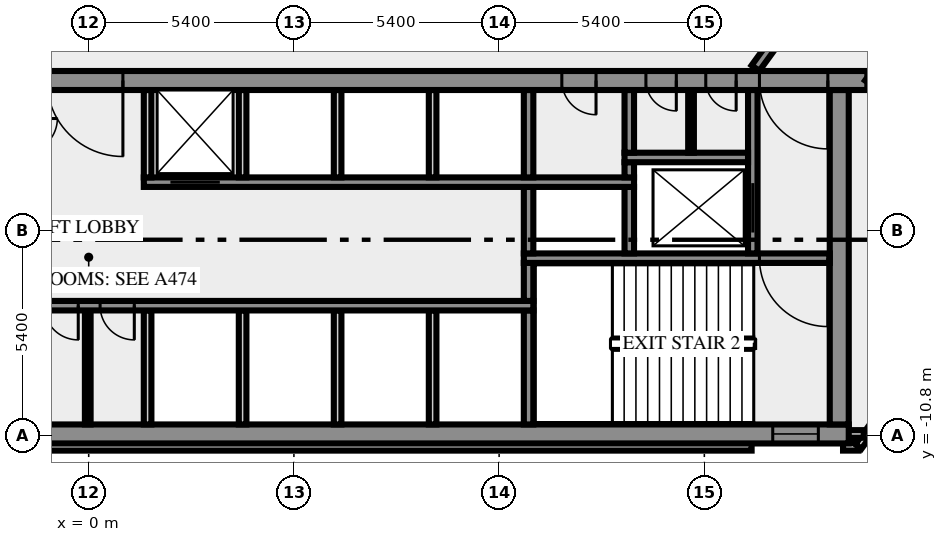
"""IFC4 building model, lengths in metres.
Left out: names, types, materials, properties, quantities, classifications, styles, units other than length and angle.
Written with IfcOpenShell. Run it as: python <this file> out.ifc"""

import sys

from ifc_helpers import new_model, si_unit, direction, frame, frame_2d, origin, place, context, subcontext, project, spatial, rectangle, extrude, element, fill, save


model = new_model("IFC4")
c1 = context("Model", 3, precision=1e-05, world=origin(), true_north=direction((0.0, 1.0)))
c2 = subcontext(c1, "Body", "Model", "MODEL_VIEW")
j1 = project(units=[si_unit("LENGTHUNIT", "METRE"), si_unit("PLANEANGLEUNIT", "RADIAN")], contexts=[c1])
p1 = place(None, origin())
s1 = spatial("IfcSite", under=j1, at=p1, CompositionType="ELEMENT")
p2 = place(p1, origin())
s2 = spatial("IfcBuilding", under=s1, at=p2, CompositionType="ELEMENT")
p3 = place(p2, frame((0.0, 0.0, 125.0)))
s3 = spatial("IfcBuildingStorey", under=s2, at=p3, CompositionType="ELEMENT", Elevation=125.0)
p4 = place(p3, frame((-17.444, -11.088, 0.0), z_axis=(0.0, 0.0, 1.0), x_axis=(1.0, 0.0, 0.0)))
e1 = element("IfcWall", 1, at=p4, inside=s3, PredefinedType="SOLIDWALL", context=c2, shape_type="SweptSolid", body=[
    extrude(rectangle(XDim=34.888, YDim=0.2, at=frame_2d((17.444, 0.0))), origin(), (0.0, 0.0, 1.0), 3.65),
])
p5 = place(p3, frame((19.85, -11.088, 0.0), z_axis=(0.0, 0.0, 1.0), x_axis=(1.0, 0.0, 0.0)))
e2 = element("IfcWall", 2, at=p5, inside=s3, PredefinedType="SOLIDWALL", context=c2, shape_type="SweptSolid", body=[
    extrude(rectangle(XDim=0.406, YDim=0.2, at=frame_2d((0.203, 0.0))), origin(), (0.0, 0.0, 1.0), 3.65),
])
p6 = place(p3, frame((20.253, -11.083, 0.0), z_axis=(0.0, 0.0, 1.0), x_axis=(0.587766567315, 0.809030569476, 0.0)))
e3 = element("IfcWall", 3, at=p6, inside=s3, PredefinedType="SOLIDWALL", context=c2, shape_type="SweptSolid", body=[
    extrude(rectangle(XDim=2.688, YDim=0.2, at=frame_2d((1.344, 0.0))), origin(), (0.0, 0.0, 1.0), 3.65),
])
p7 = place(p3, frame((19.98, -10.75, 0.0), z_axis=(0.0, 0.0, 1.0), x_axis=(1.0, 0.0, 0.0)))
e4 = element("IfcWall", 4, at=p7, inside=s3, PredefinedType="SOLIDWALL", context=c2, shape_type="SweptSolid", body=[
    extrude(rectangle(XDim=0.417, YDim=0.2, at=frame_2d((0.208, 0.0))), origin(), (0.0, 0.0, 1.0), 3.65),
])
p8 = place(p3, frame((-20.0, -10.75, 0.0), z_axis=(0.0, 0.0, 1.0), x_axis=(1.0, 0.0, 0.0)))
e5 = element("IfcWall", 5, at=p8, inside=s3, PredefinedType="SHEAR", context=c2, shape_type="SweptSolid", body=[
    extrude(rectangle(XDim=40.0, YDim=0.5, at=frame_2d((20.0, 0.0))), origin(), (0.0, 0.0, 1.0), 3.65),
])
p9 = place(p8, frame((0.8, 0.0, 1.0)))
e6 = element("IfcOpeningElement", 6, at=p9, cuts=e5, PredefinedType="OPENING", context=c2, shape_type="SweptSolid", body=[
    extrude(rectangle(XDim=1.2, YDim=1.2, at=frame_2d((0.6, 0.6))), frame((0.0, 0.26, 0.0), z_axis=(0.0, -1.0, 0.0), x_axis=(1.0, 0.0, 0.0)), (0.0, 0.0, 1.0), 0.52),
])
p10 = place(p8, frame((38.0, 0.0, 1.0)))
e7 = element("IfcOpeningElement", 7, at=p10, cuts=e5, PredefinedType="OPENING", context=c2, shape_type="SweptSolid", body=[
    extrude(rectangle(XDim=1.2, YDim=1.2, at=frame_2d((0.6, 0.6))), frame((0.0, 0.26, 0.0), z_axis=(0.0, -1.0, 0.0), x_axis=(1.0, 0.0, 0.0)), (0.0, 0.0, 1.0), 0.52),
])
p11 = place(p3, frame((-0.025, -10.5, 0.0), z_axis=(0.0, 0.0, 1.0), x_axis=(0.0, 1.0, 0.0)))
e8 = element("IfcWall", 8, at=p11, inside=s3, PredefinedType="PARTITIONING", context=c2, shape_type="SweptSolid", body=[
    extrude(rectangle(XDim=3.0, YDim=0.15, at=frame_2d((1.5, 0.0))), origin(), (0.0, 0.0, 1.0), 3.65),
])
for number, where, z_axis, x_axis in (
    (9, (1.55, -10.5, 0.0), (0.0, 0.0, 1.0), (0.0, 1.0, 0.0)),
    (10, (4.05, -10.5, 0.0), (0.0, 0.0, 1.0), (0.0, 1.0, 0.0)),
    (11, (6.55, -10.5, 0.0), (0.0, 0.0, 1.0), (0.0, 1.0, 0.0)),
    (12, (9.05, -10.5, 0.0), (0.0, 0.0, 1.0), (0.0, 1.0, 0.0)),
):
    element("IfcWall", number, at=place(p3, frame(where, z_axis=z_axis, x_axis=x_axis)), inside=s3, PredefinedType="SOLIDWALL", context=c2, shape_type="SweptSolid", body=[
        extrude(rectangle(XDim=3.0, YDim=0.2, at=frame_2d((1.5, 0.0))), origin(), (0.0, 0.0, 1.0), 3.65),
    ])
p12 = place(p3, frame((11.575, -10.5, 0.0), z_axis=(0.0, 0.0, 1.0), x_axis=(0.0, 1.0, 0.0)))
e13 = element("IfcWall", 13, at=p12, inside=s3, PredefinedType="SHEAR", context=c2, shape_type="SweptSolid", body=[
    extrude(rectangle(XDim=3.0, YDim=0.25, at=frame_2d((1.5, 0.0))), origin(), (0.0, 0.0, 1.0), 3.65),
])
p13 = place(p3, frame((19.75, -10.5, 0.0), z_axis=(0.0, 0.0, 1.0), x_axis=(0.0, 1.0, 0.0)))
e14 = element("IfcWall", 14, at=p13, inside=s3, PredefinedType="SHEAR", context=c2, shape_type="SweptSolid", body=[
    extrude(rectangle(XDim=8.8, YDim=0.5, at=frame_2d((4.4, 0.0))), origin(), (0.0, 0.0, 1.0), 3.65),
])
p14 = place(p3, frame((11.7, -7.375, 0.0), z_axis=(0.0, 0.0, 1.0), x_axis=(-1.0, 0.0, 0.0)))
e15 = element("IfcWall", 15, at=p14, inside=s3, PredefinedType="SHEAR", context=c2, shape_type="SweptSolid", body=[
    extrude(rectangle(XDim=23.4, YDim=0.25, at=frame_2d((11.7, 0.0))), origin(), (0.0, 0.0, 1.0), 3.65),
])
p15 = place(p14, frame((21.45, 0.0, 0.0)))
e16 = element("IfcOpeningElement", 16, at=p15, cuts=e15, PredefinedType="OPENING", context=c2, shape_type="SweptSolid", body=[
    extrude(rectangle(XDim=1.1, YDim=2.1, at=frame_2d((0.55, 1.05))), frame((0.0, 0.135, 0.0), z_axis=(0.0, -1.0, 0.0), x_axis=(1.0, 0.0, 0.0)), (0.0, 0.0, 1.0), 0.27),
])
p16 = place(p14, frame((18.95, 0.0, 0.0)))
e17 = element("IfcOpeningElement", 17, at=p16, cuts=e15, PredefinedType="OPENING", context=c2, shape_type="SweptSolid", body=[
    extrude(rectangle(XDim=1.1, YDim=2.1, at=frame_2d((0.55, 1.05))), frame((0.0, 0.135, 0.0), z_axis=(0.0, -1.0, 0.0), x_axis=(1.0, 0.0, 0.0)), (0.0, 0.0, 1.0), 0.27),
])
p17 = place(p14, frame((16.45, 0.0, 0.0)))
e18 = element("IfcOpeningElement", 18, at=p17, cuts=e15, PredefinedType="OPENING", context=c2, shape_type="SweptSolid", body=[
    extrude(rectangle(XDim=1.1, YDim=2.1, at=frame_2d((0.55, 1.05))), frame((0.0, 0.135, 0.0), z_axis=(0.0, -1.0, 0.0), x_axis=(1.0, 0.0, 0.0)), (0.0, 0.0, 1.0), 0.27),
])
p18 = place(p14, frame((14.75, 0.0, 0.0)))
e19 = element("IfcOpeningElement", 19, at=p18, cuts=e15, PredefinedType="OPENING", context=c2, shape_type="SweptSolid", body=[
    extrude(rectangle(XDim=0.7, YDim=2.1, at=frame_2d((0.35, 1.05))), frame((0.0, 0.135, 0.0), z_axis=(0.0, -1.0, 0.0), x_axis=(1.0, 0.0, 0.0)), (0.0, 0.0, 1.0), 0.27),
])
p19 = place(p14, frame((13.35, 0.0, 0.0)))
e20 = element("IfcOpeningElement", 20, at=p19, cuts=e15, PredefinedType="OPENING", context=c2, shape_type="SweptSolid", body=[
    extrude(rectangle(XDim=0.9, YDim=2.1, at=frame_2d((0.45, 1.05))), frame((0.0, 0.135, 0.0), z_axis=(0.0, -1.0, 0.0), x_axis=(1.0, 0.0, 0.0)), (0.0, 0.0, 1.0), 0.27),
])
p20 = place(p14, frame((11.975, 0.0, 0.0)))
e21 = element("IfcOpeningElement", 21, at=p20, cuts=e15, PredefinedType="OPENING", context=c2, shape_type="SweptSolid", body=[
    extrude(rectangle(XDim=0.9, YDim=2.1, at=frame_2d((0.45, 1.05))), frame((0.0, 0.135, 0.0), z_axis=(0.0, -1.0, 0.0), x_axis=(1.0, 0.0, 0.0)), (0.0, 0.0, 1.0), 0.27),
])
p21 = place(p14, frame((10.5, 0.0, 0.0)))
e22 = element("IfcOpeningElement", 22, at=p21, cuts=e15, PredefinedType="OPENING", context=c2, shape_type="SweptSolid", body=[
    extrude(rectangle(XDim=0.9, YDim=2.1, at=frame_2d((0.45, 1.05))), frame((0.0, 0.135, 0.0), z_axis=(0.0, -1.0, 0.0), x_axis=(1.0, 0.0, 0.0)), (0.0, 0.0, 1.0), 0.27),
])
p22 = place(p3, frame((11.575, -7.25, 0.0), z_axis=(0.0, 0.0, 1.0), x_axis=(0.0, 1.0, 0.0)))
e23 = element("IfcWall", 23, at=p22, inside=s3, PredefinedType="SHEAR", context=c2, shape_type="SweptSolid", body=[
    extrude(rectangle(XDim=1.0, YDim=0.25, at=frame_2d((0.5, 0.0))), origin(), (0.0, 0.0, 1.0), 3.65),
])
p23 = place(p3, frame((19.5, -6.125, 0.0), z_axis=(0.0, 0.0, 1.0), x_axis=(-1.0, 0.0, 0.0)))
e24 = element("IfcWall", 24, at=p23, inside=s3, PredefinedType="SHEAR", context=c2, shape_type="SweptSolid", body=[
    extrude(rectangle(XDim=8.05, YDim=0.25, at=frame_2d((4.025, 0.0))), origin(), (0.0, 0.0, 1.0), 3.65),
])
p24 = place(p23, frame((0.05, 0.0, 0.0)))
e25 = element("IfcOpeningElement", 25, at=p24, cuts=e24, PredefinedType="OPENING", context=c2, shape_type="SweptSolid", body=[
    extrude(rectangle(XDim=1.8, YDim=2.1, at=frame_2d((0.9, 1.05))), frame((0.0, 0.135, 0.0), z_axis=(0.0, -1.0, 0.0), x_axis=(1.0, 0.0, 0.0)), (0.0, 0.0, 1.0), 0.27),
])
for number, where, z_axis, x_axis in (
    (26, (11.575, -6.0, 0.0), (0.0, 0.0, 1.0), (0.0, 1.0, 0.0)),
    (27, (14.225, -6.0, 0.0), (0.0, 0.0, 1.0), (0.0, 1.0, 0.0)),
):
    element("IfcWall", number, at=place(p3, frame(where, z_axis=z_axis, x_axis=x_axis)), inside=s3, PredefinedType="SHEAR", context=c2, shape_type="SweptSolid", body=[
        extrude(rectangle(XDim=1.75, YDim=0.25, at=frame_2d((0.875, 0.0))), origin(), (0.0, 0.0, 1.0), 3.65),
    ])
p25 = place(p3, frame((17.475, -6.0, 0.0), z_axis=(0.0, 0.0, 1.0), x_axis=(0.0, 1.0, 0.0)))
e28 = element("IfcWall", 28, at=p25, inside=s3, PredefinedType="SHEAR", context=c2, shape_type="SweptSolid", body=[
    extrude(rectangle(XDim=4.3, YDim=0.25, at=frame_2d((2.15, 0.0))), origin(), (0.0, 0.0, 1.0), 3.65),
])
p26 = place(p25, frame((0.55, 0.0, 0.0)))
e29 = element("IfcOpeningElement", 29, at=p26, cuts=e28, PredefinedType="OPENING", context=c2, shape_type="SweptSolid", body=[
    extrude(rectangle(XDim=1.3, YDim=2.1, at=frame_2d((0.65, 1.05))), frame((0.0, 0.135, 0.0), z_axis=(0.0, -1.0, 0.0), x_axis=(1.0, 0.0, 0.0)), (0.0, 0.0, 1.0), 0.27),
])
p27 = place(p3, frame((1.45, -4.125, 0.0), z_axis=(0.0, 0.0, 1.0), x_axis=(1.0, 0.0, 0.0)))
e30 = element("IfcWall", 30, at=p27, inside=s3, PredefinedType="SHEAR", context=c2, shape_type="SweptSolid", body=[
    extrude(rectangle(XDim=12.9, YDim=0.25, at=frame_2d((6.45, 0.0))), origin(), (0.0, 0.0, 1.0), 3.65),
])
p28 = place(p27, frame((0.7, 0.0, 0.0)))
e31 = element("IfcOpeningElement", 31, at=p28, cuts=e30, PredefinedType="OPENING", context=c2, shape_type="SweptSolid", body=[
    extrude(rectangle(XDim=1.3, YDim=2.1, at=frame_2d((0.65, 1.05))), frame((0.0, 0.135, 0.0), z_axis=(0.0, -1.0, 0.0), x_axis=(1.0, 0.0, 0.0)), (0.0, 0.0, 1.0), 0.27),
])
for number, where, z_axis, x_axis in (
    (32, (1.55, -4.0, 0.0), (0.0, 0.0, 1.0), (0.0, 1.0, 0.0)),
    (33, (4.05, -4.0, 0.0), (0.0, 0.0, 1.0), (0.0, 1.0, 0.0)),
    (34, (6.55, -4.0, 0.0), (0.0, 0.0, 1.0), (0.0, 1.0, 0.0)),
    (35, (9.05, -4.0, 0.0), (0.0, 0.0, 1.0), (0.0, 1.0, 0.0)),
):
    element("IfcWall", number, at=place(p3, frame(where, z_axis=z_axis, x_axis=x_axis)), inside=s3, PredefinedType="SOLIDWALL", context=c2, shape_type="SweptSolid", body=[
        extrude(rectangle(XDim=2.3, YDim=0.2, at=frame_2d((1.15, 0.0))), origin(), (0.0, 0.0, 1.0), 3.65),
    ])
p29 = place(p3, frame((11.575, -4.0, 0.0), z_axis=(0.0, 0.0, 1.0), x_axis=(0.0, 1.0, 0.0)))
e36 = element("IfcWall", 36, at=p29, inside=s3, PredefinedType="SHEAR", context=c2, shape_type="SweptSolid", body=[
    extrude(rectangle(XDim=2.3, YDim=0.25, at=frame_2d((1.15, 0.0))), origin(), (0.0, 0.0, 1.0), 3.65),
])
p30 = place(p3, frame((14.225, -4.0, 0.0), z_axis=(0.0, 0.0, 1.0), x_axis=(0.0, 1.0, 0.0)))
e37 = element("IfcWall", 37, at=p30, inside=s3, PredefinedType="SHEAR", context=c2, shape_type="SweptSolid", body=[
    extrude(rectangle(XDim=0.4, YDim=0.25, at=frame_2d((0.2, 0.0))), origin(), (0.0, 0.0, 1.0), 3.65),
])
p31 = place(p3, frame((14.1, -3.475, 0.0), z_axis=(0.0, 0.0, 1.0), x_axis=(1.0, 0.0, 0.0)))
e38 = element("IfcWall", 38, at=p31, inside=s3, PredefinedType="SHEAR", context=c2, shape_type="SweptSolid", body=[
    extrude(rectangle(XDim=3.25, YDim=0.25, at=frame_2d((1.625, 0.0))), origin(), (0.0, 0.0, 1.0), 3.65),
])
p32 = place(p3, frame((14.225, -3.35, 0.0), z_axis=(0.0, 0.0, 1.0), x_axis=(0.0, 1.0, 0.0)))
e39 = element("IfcWall", 39, at=p32, inside=s3, PredefinedType="SHEAR", context=c2, shape_type="SweptSolid", body=[
    extrude(rectangle(XDim=1.65, YDim=0.25, at=frame_2d((0.825, 0.0))), origin(), (0.0, 0.0, 1.0), 3.65),
])
p33 = place(p3, frame((15.85, -3.35, 0.0), z_axis=(0.0, 0.0, 1.0), x_axis=(0.0, 1.0, 0.0)))
e40 = element("IfcWall", 40, at=p33, inside=s3, PredefinedType="PARTITIONING", context=c2, shape_type="SweptSolid", body=[
    extrude(rectangle(XDim=1.65, YDim=0.15, at=frame_2d((0.825, 0.0))), origin(), (0.0, 0.0, 1.0), 3.65),
])
p34 = place(p3, frame((20.49, -1.45, 0.0), z_axis=(0.0, 0.0, 1.0), x_axis=(-1.0, 0.0, 0.0)))
e41 = element("IfcWall", 41, at=p34, inside=s3, PredefinedType="SHEAR", context=c2, shape_type="SweptSolid", body=[
    extrude(rectangle(XDim=40.98, YDim=0.5, at=frame_2d((20.49, 0.0))), origin(), (0.0, 0.0, 1.0), 3.65),
])
p35 = place(p34, frame((38.14, 0.0, 0.0)))
e42 = element("IfcOpeningElement", 42, at=p35, cuts=e41, PredefinedType="OPENING", context=c2, shape_type="SweptSolid", body=[
    extrude(rectangle(XDim=1.8, YDim=2.1, at=frame_2d((0.9, 1.05))), frame((0.0, 0.26, 0.0), z_axis=(0.0, -1.0, 0.0), x_axis=(1.0, 0.0, 0.0)), (0.0, 0.0, 1.0), 0.52),
])
p36 = place(p34, frame((35.89, 0.0, 0.0)))
e43 = element("IfcOpeningElement", 43, at=p36, cuts=e41, PredefinedType="OPENING", context=c2, shape_type="SweptSolid", body=[
    extrude(rectangle(XDim=0.9, YDim=2.1, at=frame_2d((0.45, 1.05))), frame((0.0, 0.26, 0.0), z_axis=(0.0, -1.0, 0.0), x_axis=(1.0, 0.0, 0.0)), (0.0, 0.0, 1.0), 0.52),
])
p37 = place(p34, frame((32.94, 0.0, 0.0)))
e44 = element("IfcOpeningElement", 44, at=p37, cuts=e41, PredefinedType="OPENING", context=c2, shape_type="SweptSolid", body=[
    extrude(rectangle(XDim=0.9, YDim=2.1, at=frame_2d((0.45, 1.05))), frame((0.0, 0.26, 0.0), z_axis=(0.0, -1.0, 0.0), x_axis=(1.0, 0.0, 0.0)), (0.0, 0.0, 1.0), 0.52),
])
p38 = place(p34, frame((19.59, 0.0, 0.0)))
e45 = element("IfcOpeningElement", 45, at=p38, cuts=e41, PredefinedType="OPENING", context=c2, shape_type="SweptSolid", body=[
    extrude(rectangle(XDim=2.0, YDim=2.1, at=frame_2d((1.0, 1.05))), frame((0.0, 0.26, 0.0), z_axis=(0.0, -1.0, 0.0), x_axis=(1.0, 0.0, 0.0)), (0.0, 0.0, 1.0), 0.52),
])
p39 = place(p34, frame((7.14, 0.0, 0.0)))
e46 = element("IfcOpeningElement", 46, at=p39, cuts=e41, PredefinedType="OPENING", context=c2, shape_type="SweptSolid", body=[
    extrude(rectangle(XDim=0.9, YDim=2.1, at=frame_2d((0.45, 1.05))), frame((0.0, 0.26, 0.0), z_axis=(0.0, -1.0, 0.0), x_axis=(1.0, 0.0, 0.0)), (0.0, 0.0, 1.0), 0.52),
])
p40 = place(p34, frame((5.028, 0.0, 0.0)))
e47 = element("IfcOpeningElement", 47, at=p40, cuts=e41, PredefinedType="OPENING", context=c2, shape_type="SweptSolid", body=[
    extrude(rectangle(XDim=0.8, YDim=2.1, at=frame_2d((0.4, 1.05))), frame((0.0, 0.26, 0.0), z_axis=(0.0, -1.0, 0.0), x_axis=(1.0, 0.0, 0.0)), (0.0, 0.0, 1.0), 0.52),
])
p41 = place(p34, frame((3.452, 0.0, 0.0)))
e48 = element("IfcOpeningElement", 48, at=p41, cuts=e41, PredefinedType="OPENING", context=c2, shape_type="SweptSolid", body=[
    extrude(rectangle(XDim=0.8, YDim=2.1, at=frame_2d((0.4, 1.05))), frame((0.0, 0.26, 0.0), z_axis=(0.0, -1.0, 0.0), x_axis=(1.0, 0.0, 0.0)), (0.0, 0.0, 1.0), 0.52),
])
p42 = place(p34, frame((1.04, 0.0, 0.0)))
e49 = element("IfcOpeningElement", 49, at=p42, cuts=e41, PredefinedType="OPENING", context=c2, shape_type="SweptSolid", body=[
    extrude(rectangle(XDim=1.8, YDim=2.1, at=frame_2d((0.9, 1.05))), frame((0.0, 0.26, 0.0), z_axis=(0.0, -1.0, 0.0), x_axis=(1.0, 0.0, 0.0)), (0.0, 0.0, 1.0), 0.52),
])
p43 = place(p3, frame((17.545, -1.125, 0.0), z_axis=(0.0, 0.0, 1.0), x_axis=(0.587786330937, 0.809016210693, 0.0)))
e50 = element("IfcWall", 50, at=p43, inside=s3, PredefinedType="SOLIDWALL", context=c2, shape_type="SweptSolid", body=[
    extrude(rectangle(XDim=30.103, YDim=0.25, at=frame_2d((15.052, 0.0))), origin(), (0.0, 0.0, 1.0), 3.65),
])
p44 = place(p43, frame((3.441, 0.0, 0.0)))
e51 = element("IfcOpeningElement", 51, at=p44, cuts=e50, PredefinedType="OPENING", context=c2, shape_type="SweptSolid", body=[
    extrude(rectangle(XDim=0.9, YDim=2.1, at=frame_2d((0.45, 1.05))), frame((0.0, 0.135, 0.0), z_axis=(0.0, -1.0, 0.0), x_axis=(1.0, 0.0, 0.0)), (0.0, 0.0, 1.0), 0.27),
])
p45 = place(p43, frame((28.729, 0.0, 0.0)))
e52 = element("IfcOpeningElement", 52, at=p45, cuts=e50, PredefinedType="OPENING", context=c2, shape_type="SweptSolid", body=[
    extrude(rectangle(XDim=0.9, YDim=2.1, at=frame_2d((0.45, 1.05))), frame((0.0, 0.135, 0.0), z_axis=(0.0, -1.0, 0.0), x_axis=(1.0, 0.0, 0.0)), (0.0, 0.0, 1.0), 0.27),
])
p46 = place(p3, frame((37.236, 21.469, 0.0), z_axis=(0.0, 0.0, 1.0), x_axis=(-0.58778344073, -0.809018310549, 0.0)))
e53 = element("IfcWall", 53, at=p46, inside=s3, PredefinedType="SOLIDWALL", context=c2, shape_type="SweptSolid", body=[
    extrude(rectangle(XDim=28.42, YDim=0.25, at=frame_2d((14.21, 0.0))), origin(), (0.0, 0.0, 1.0), 3.65),
])
p47 = place(p46, frame((13.205, 0.0, 0.0)))
e54 = element("IfcOpeningElement", 54, at=p47, cuts=e53, PredefinedType="OPENING", context=c2, shape_type="SweptSolid", body=[
    extrude(rectangle(XDim=1.0, YDim=2.1, at=frame_2d((0.5, 1.05))), frame((0.0, 0.135, 0.0), z_axis=(0.0, -1.0, 0.0), x_axis=(1.0, 0.0, 0.0)), (0.0, 0.0, 1.0), 0.27),
])
p48 = place(p46, frame((0.224, 0.0, 0.0)))
e55 = element("IfcOpeningElement", 55, at=p48, cuts=e53, PredefinedType="OPENING", context=c2, shape_type="SweptSolid", body=[
    extrude(rectangle(XDim=0.9, YDim=2.1, at=frame_2d((0.45, 1.05))), frame((0.0, 0.135, 0.0), z_axis=(0.0, -1.0, 0.0), x_axis=(1.0, 0.0, 0.0)), (0.0, 0.0, 1.0), 0.27),
])
p49 = place(p10, origin())
e56 = element("IfcWindow", 56, at=p49, inside=s3, PartitioningType="SINGLE_PANEL", PredefinedType="WINDOW", context=c2, shape_type="SweptSolid", body=[
    extrude(rectangle(XDim=1.2, YDim=1.2, at=frame_2d((0.6, 0.6))), frame((0.0, 0.03, 0.0), z_axis=(0.0, -1.0, 0.0), x_axis=(1.0, 0.0, 0.0)), (0.0, 0.0, 1.0), 0.06),
])
fill(e7, e56)
p50 = place(p20, origin())
e57 = element("IfcDoor", 57, at=p50, inside=s3, OperationType="SINGLE_SWING_RIGHT", PredefinedType="DOOR", context=c2, shape_type="SweptSolid", body=[
    extrude(rectangle(XDim=0.9, YDim=2.1, at=frame_2d((0.45, 1.05))), frame((0.0, 0.025, 0.0), z_axis=(0.0, -1.0, 0.0), x_axis=(1.0, 0.0, 0.0)), (0.0, 0.0, 1.0), 0.05),
])
fill(e21, e57)
p51 = place(p21, origin())
e58 = element("IfcDoor", 58, at=p51, inside=s3, OperationType="SINGLE_SWING_LEFT", PredefinedType="DOOR", context=c2, shape_type="SweptSolid", body=[
    extrude(rectangle(XDim=0.9, YDim=2.1, at=frame_2d((0.45, 1.05))), frame((0.0, 0.025, 0.0), z_axis=(0.0, -1.0, 0.0), x_axis=(1.0, 0.0, 0.0)), (0.0, 0.0, 1.0), 0.05),
])
fill(e22, e58)
p52 = place(p24, origin())
e59 = element("IfcDoor", 59, at=p52, inside=s3, OperationType="DOUBLE_DOOR_SINGLE_SWING", PredefinedType="DOOR", context=c2, shape_type="SweptSolid", body=[
    extrude(rectangle(XDim=1.8, YDim=2.1, at=frame_2d((0.9, 1.05))), frame((0.0, 0.025, 0.0), z_axis=(0.0, -1.0, 0.0), x_axis=(1.0, 0.0, 0.0)), (0.0, 0.0, 1.0), 0.05),
])
fill(e25, e59)
p53 = place(p26, origin())
e60 = element("IfcDoor", 60, at=p53, inside=s3, OperationType="DOUBLE_DOOR_SLIDING", PredefinedType="DOOR", context=c2, shape_type="SweptSolid", body=[
    extrude(rectangle(XDim=1.3, YDim=2.1, at=frame_2d((0.65, 1.05))), frame((0.0, 0.025, 0.0), z_axis=(0.0, -1.0, 0.0), x_axis=(1.0, 0.0, 0.0)), (0.0, 0.0, 1.0), 0.05),
])
fill(e29, e60)
p54 = place(p28, origin())
e61 = element("IfcDoor", 61, at=p54, inside=s3, OperationType="DOUBLE_DOOR_SLIDING", PredefinedType="DOOR", context=c2, shape_type="SweptSolid", body=[
    extrude(rectangle(XDim=1.3, YDim=2.1, at=frame_2d((0.65, 1.05))), frame((0.0, 0.025, 0.0), z_axis=(0.0, -1.0, 0.0), x_axis=(1.0, 0.0, 0.0)), (0.0, 0.0, 1.0), 0.05),
])
fill(e31, e61)
p55 = place(p38, origin())
e62 = element("IfcDoor", 62, at=p55, inside=s3, OperationType="DOUBLE_DOOR_SINGLE_SWING", PredefinedType="DOOR", context=c2, shape_type="SweptSolid", body=[
    extrude(rectangle(XDim=2.0, YDim=2.1, at=frame_2d((1.0, 1.05))), frame((0.0, 0.025, 0.0), z_axis=(0.0, -1.0, 0.0), x_axis=(1.0, 0.0, 0.0)), (0.0, 0.0, 1.0), 0.05),
])
fill(e45, e62)
p56 = place(p39, origin())
e63 = element("IfcDoor", 63, at=p56, inside=s3, OperationType="SINGLE_SWING_LEFT", PredefinedType="DOOR", context=c2, shape_type="SweptSolid", body=[
    extrude(rectangle(XDim=0.9, YDim=2.1, at=frame_2d((0.45, 1.05))), frame((0.0, 0.025, 0.0), z_axis=(0.0, -1.0, 0.0), x_axis=(1.0, 0.0, 0.0)), (0.0, 0.0, 1.0), 0.05),
])
fill(e46, e63)
p57 = place(p40, origin())
e64 = element("IfcDoor", 64, at=p57, inside=s3, OperationType="SINGLE_SWING_LEFT", PredefinedType="DOOR", context=c2, shape_type="SweptSolid", body=[
    extrude(rectangle(XDim=0.8, YDim=2.1, at=frame_2d((0.4, 1.05))), frame((0.0, 0.025, 0.0), z_axis=(0.0, -1.0, 0.0), x_axis=(1.0, 0.0, 0.0)), (0.0, 0.0, 1.0), 0.05),
])
fill(e47, e64)
p58 = place(p41, origin())
e65 = element("IfcDoor", 65, at=p58, inside=s3, OperationType="SINGLE_SWING_LEFT", PredefinedType="DOOR", context=c2, shape_type="SweptSolid", body=[
    extrude(rectangle(XDim=0.8, YDim=2.1, at=frame_2d((0.4, 1.05))), frame((0.0, 0.025, 0.0), z_axis=(0.0, -1.0, 0.0), x_axis=(1.0, 0.0, 0.0)), (0.0, 0.0, 1.0), 0.05),
])
fill(e48, e65)
p59 = place(p42, origin())
e66 = element("IfcDoor", 66, at=p59, inside=s3, OperationType="DOUBLE_DOOR_SINGLE_SWING", PredefinedType="DOOR", context=c2, shape_type="SweptSolid", body=[
    extrude(rectangle(XDim=1.8, YDim=2.1, at=frame_2d((0.9, 1.05))), frame((0.0, 0.025, 0.0), z_axis=(0.0, -1.0, 0.0), x_axis=(1.0, 0.0, 0.0)), (0.0, 0.0, 1.0), 0.05),
])
fill(e49, e66)
save(model, sys.argv[1])
